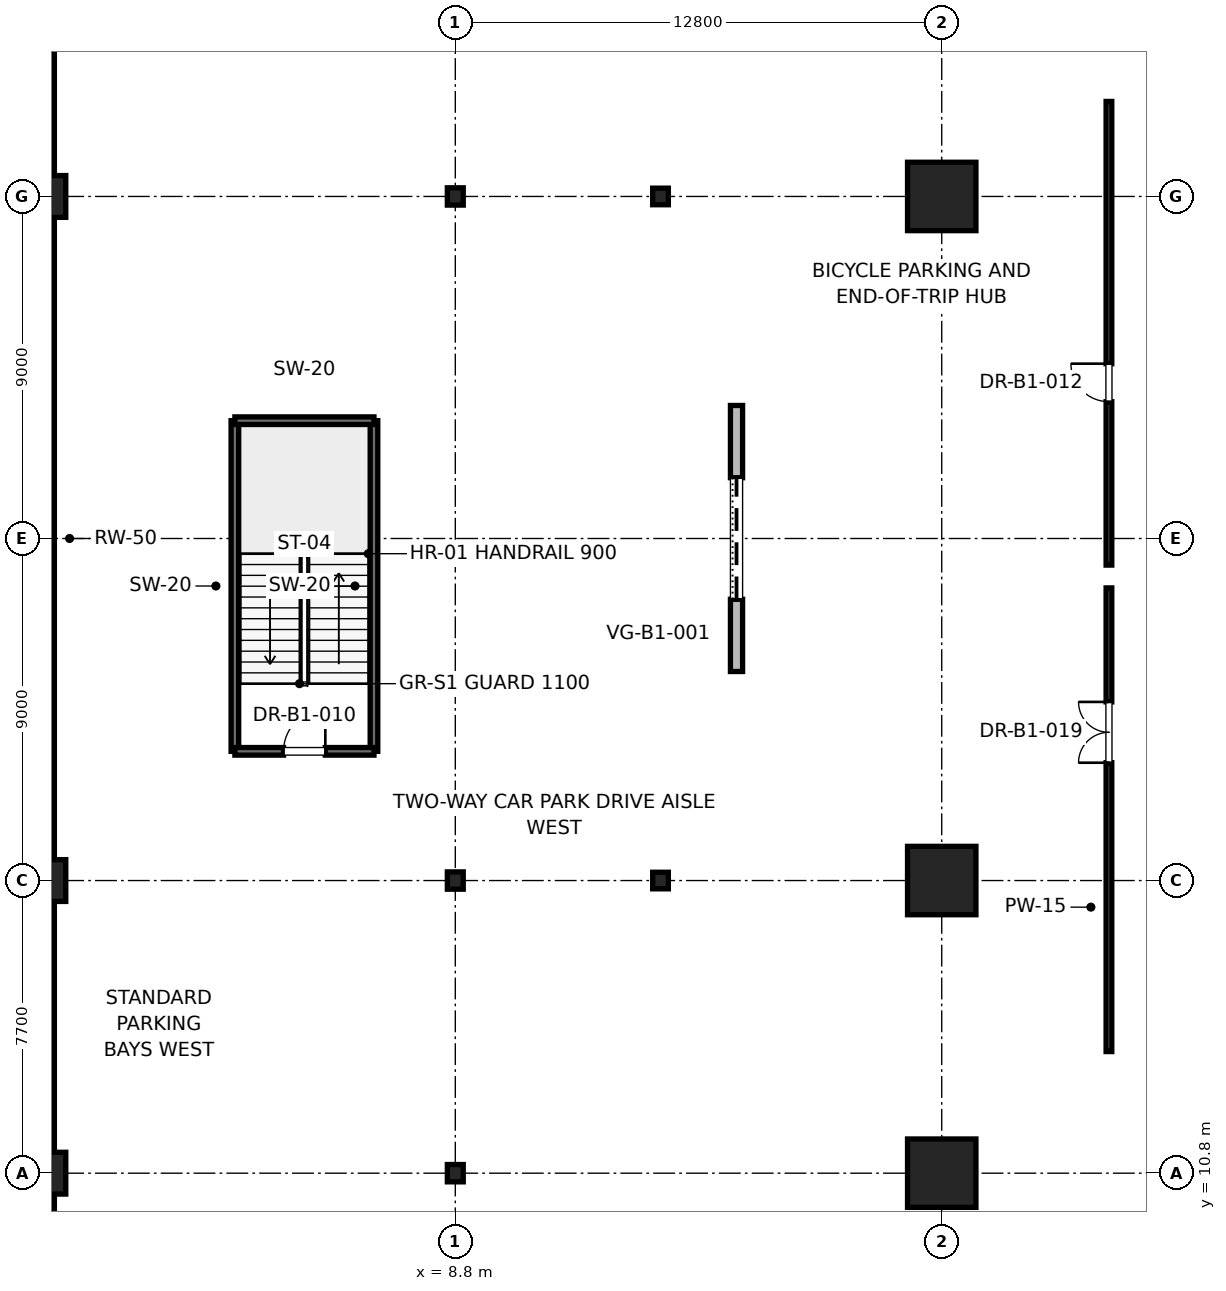
"""IFC4 building model, lengths in metres.
Left out: names, types, materials, properties, quantities, classifications, styles, units other than length and angle.
Written with IfcOpenShell. Run it as: python <this file> out.ifc"""

import sys

from ifc_helpers import new_model, si_unit, direction, frame, frame_2d, origin, origin_2d, place, context, subcontext, project, spatial, rectangle, i_section, extrude, element, fill, save


model = new_model("IFC4")
c1 = context("Model", 3, precision=1e-05, world=origin(), true_north=direction((0.0, 1.0)))
c2 = subcontext(c1, "Body", "Model", "MODEL_VIEW")
j1 = project(units=[si_unit("LENGTHUNIT", "METRE"), si_unit("PLANEANGLEUNIT", "RADIAN")], contexts=[c1])
p1 = place(None, origin())
s1 = spatial("IfcSite", under=j1, at=p1, CompositionType="ELEMENT")
p2 = place(p1, origin())
s2 = spatial("IfcBuilding", under=s1, at=p2, CompositionType="ELEMENT")
p3 = place(p2, frame((0.0, 0.0, -4.5)))
s3 = spatial("IfcBuildingStorey", under=s2, at=p3, CompositionType="ELEMENT", Elevation=-4.5)
for number, where, z_axis, x_axis in (
    (1, (21.6, 18.5, 0.0), (0.0, 0.0, 1.0), (1.0, 0.0, 0.0)),
    (2, (21.6, 36.5, 0.0), (0.0, 0.0, 1.0), (1.0, 0.0, 0.0)),
    (3, (21.6, 10.8, 0.0), (0.0, 0.0, 1.0), (1.0, 0.0, 0.0)),
):
    element("IfcColumn", number, at=place(p3, frame(where, z_axis=z_axis, x_axis=x_axis)), inside=s3, PredefinedType="COLUMN", context=c2, shape_type="SweptSolid", body=[
        extrude(rectangle(XDim=1.8, YDim=1.8, at=origin_2d()), origin(), (0.0, 0.0, 1.0), 4.5),
    ])
for number, where, z_axis, x_axis in (
    (4, (14.2, 18.5, 0.0), (0.0, 0.0, 1.0), (1.0, 0.0, 0.0)),
    (5, (14.2, 36.5, 0.0), (0.0, 0.0, 1.0), (1.0, 0.0, 0.0)),
):
    element("IfcColumn", number, at=place(p3, frame(where, z_axis=z_axis, x_axis=x_axis)), inside=s3, PredefinedType="COLUMN", context=c2, shape_type="SweptSolid", body=[
        extrude(i_section(OverallWidth=0.412, OverallDepth=0.437, WebThickness=0.036, FlangeThickness=0.058, FilletRadius=0.015, at=origin_2d()), origin(), (0.0, 0.0, 1.0), 4.5),
    ])
for number, where, z_axis, x_axis in (
    (6, (-2.0, 10.8, 0.0), (0.0, 0.0, 1.0), (1.0, 0.0, 0.0)),
    (7, (-2.0, 18.5, 0.0), (0.0, 0.0, 1.0), (1.0, 0.0, 0.0)),
    (8, (-2.0, 36.5, 0.0), (0.0, 0.0, 1.0), (1.0, 0.0, 0.0)),
):
    element("IfcColumn", number, at=place(p3, frame(where, z_axis=z_axis, x_axis=x_axis)), inside=s3, PredefinedType="COLUMN", context=c2, shape_type="SweptSolid", body=[
        extrude(rectangle(XDim=1.1, YDim=1.1, at=origin_2d()), origin(), (0.0, 0.0, 1.0), 4.5),
    ])
for number, where, z_axis, x_axis in (
    (9, (8.8, 10.8, 0.0), (0.0, 0.0, 1.0), (1.0, 0.0, 0.0)),
    (10, (8.8, 18.5, 0.0), (0.0, 0.0, 1.0), (1.0, 0.0, 0.0)),
    (11, (8.8, 36.5, 0.0), (0.0, 0.0, 1.0), (1.0, 0.0, 0.0)),
):
    element("IfcColumn", number, at=place(p3, frame(where, z_axis=z_axis, x_axis=x_axis)), inside=s3, PredefinedType="COLUMN", context=c2, shape_type="SweptSolid", body=[
        extrude(i_section(OverallWidth=0.418, OverallDepth=0.456, WebThickness=0.042, FlangeThickness=0.067, FilletRadius=0.015, at=origin_2d()), origin(), (0.0, 0.0, 1.0), 4.5),
    ])
p4 = place(p3, frame((-2.0, 56.5, 0.0), z_axis=(0.0, 0.0, 1.0), x_axis=(0.0, -1.0, 0.0)))
e12 = element("IfcWall", 12, at=p4, inside=s3, PredefinedType="USERDEFINED", context=c2, shape_type="SweptSolid", body=[
    extrude(rectangle(XDim=58.0, YDim=0.5, at=frame_2d((29.0, 0.0))), origin(), (0.0, 0.0, 1.0), 3.4),
])
p5 = place(p3, frame((16.2, 24.0, 0.0), z_axis=(0.0, 0.0, 1.0), x_axis=(0.0, 1.0, 0.0)))
e13 = element("IfcWall", 13, at=p5, inside=s3, PredefinedType="SOLIDWALL", context=c2, shape_type="SweptSolid", body=[
    extrude(rectangle(XDim=7.0, YDim=0.32, at=frame_2d((3.5, 0.0))), origin(), (0.0, 0.0, 1.0), 4.22),
])
p6 = place(p5, frame((1.9, 0.0, 0.0)))
e14 = element("IfcOpeningElement", 14, at=p6, cuts=e13, PredefinedType="OPENING", context=c2, shape_type="SweptSolid", body=[
    extrude(rectangle(XDim=3.2, YDim=2.8, at=frame_2d((1.6, 1.4))), frame((0.0, 0.16, 0.0), z_axis=(0.0, -1.0, 0.0), x_axis=(1.0, 0.0, 0.0)), (0.0, 0.0, 1.0), 0.32),
])
for number, where, z_axis, x_axis in (
    (15, (3.0, 21.9, 0.0), (0.0, 0.0, 1.0), (0.0, 1.0, 0.0)),
    (16, (6.66, 21.9, 0.0), (0.0, 0.0, 1.0), (0.0, 1.0, 0.0)),
):
    element("IfcWall", number, at=place(p3, frame(where, z_axis=z_axis, x_axis=x_axis)), inside=s3, PredefinedType="SOLIDWALL", context=c2, shape_type="SweptSolid", body=[
        extrude(rectangle(XDim=8.7, YDim=0.2, at=frame_2d((4.35, 0.0))), origin(), (0.0, 0.0, 1.0), 4.22),
    ])
p7 = place(p3, frame((3.0, 30.6, 0.0), z_axis=(0.0, 0.0, 1.0), x_axis=(1.0, 0.0, 0.0)))
e17 = element("IfcWall", 17, at=p7, inside=s3, PredefinedType="SOLIDWALL", context=c2, shape_type="SweptSolid", body=[
    extrude(rectangle(XDim=3.66, YDim=0.2, at=frame_2d((1.83, 0.0))), origin(), (0.0, 0.0, 1.0), 4.22),
])
p8 = place(p3, frame((3.0, 21.9, 0.0), z_axis=(0.0, 0.0, 1.0), x_axis=(1.0, 0.0, 0.0)))
e18 = element("IfcWall", 18, at=p8, inside=s3, PredefinedType="SOLIDWALL", context=c2, shape_type="SweptSolid", body=[
    extrude(rectangle(XDim=3.66, YDim=0.2, at=frame_2d((1.83, 0.0))), origin(), (0.0, 0.0, 1.0), 4.22),
])
p9 = place(p8, frame((1.28, 0.0, 0.0)))
e19 = element("IfcOpeningElement", 19, at=p9, cuts=e18, PredefinedType="OPENING", context=c2, shape_type="SweptSolid", body=[
    extrude(rectangle(XDim=1.1, YDim=2.15, at=frame_2d((0.55, 1.075))), frame((0.0, 0.1, 0.0), z_axis=(0.0, -1.0, 0.0), x_axis=(1.0, 0.0, 0.0)), (0.0, 0.0, 1.0), 0.2),
])
p10 = place(p3, frame((26.0, 14.0, 0.0), z_axis=(0.0, 0.0, 1.0), x_axis=(0.0, 1.0, 0.0)))
e20 = element("IfcWall", 20, at=p10, inside=s3, PredefinedType="PARTITIONING", context=c2, shape_type="SweptSolid", body=[
    extrude(rectangle(XDim=12.2, YDim=0.15, at=frame_2d((6.1, 0.0))), origin(), (0.0, 0.0, 1.0), 2.85),
])
p11 = place(p10, frame((7.6, 0.0, 0.0)))
e21 = element("IfcOpeningElement", 21, at=p11, cuts=e20, PredefinedType="OPENING", context=c2, shape_type="SweptSolid", body=[
    extrude(rectangle(XDim=1.6, YDim=2.25, at=frame_2d((0.8, 1.125))), frame((0.0, 0.075, 0.0), z_axis=(0.0, -1.0, 0.0), x_axis=(1.0, 0.0, 0.0)), (0.0, 0.0, 1.0), 0.15),
])
p12 = place(p3, frame((26.0, 26.8, 0.0), z_axis=(0.0, 0.0, 1.0), x_axis=(0.0, 1.0, 0.0)))
e22 = element("IfcWall", 22, at=p12, inside=s3, PredefinedType="PARTITIONING", context=c2, shape_type="SweptSolid", body=[
    extrude(rectangle(XDim=12.2, YDim=0.15, at=frame_2d((6.1, 0.0))), origin(), (0.0, 0.0, 1.0), 2.85),
])
p13 = place(p12, frame((4.3, 0.0, 0.0)))
e23 = element("IfcOpeningElement", 23, at=p13, cuts=e22, PredefinedType="OPENING", context=c2, shape_type="SweptSolid", body=[
    extrude(rectangle(XDim=1.0, YDim=2.15, at=frame_2d((0.5, 1.075))), frame((0.0, 0.075, 0.0), z_axis=(0.0, -1.0, 0.0), x_axis=(1.0, 0.0, 0.0)), (0.0, 0.0, 1.0), 0.15),
])
p14 = place(p6, origin())
e24 = element("IfcDoor", 24, at=p14, inside=s3, OperationType="ROLLINGUP", PredefinedType="GATE", context=c2, shape_type="SweptSolid", body=[
    extrude(rectangle(XDim=3.2, YDim=2.8, at=frame_2d((1.6, 1.4))), frame((0.0, 0.025, 0.0), z_axis=(0.0, -1.0, 0.0), x_axis=(1.0, 0.0, 0.0)), (0.0, 0.0, 1.0), 0.05),
])
fill(e14, e24)
p15 = place(p9, origin())
e25 = element("IfcDoor", 25, at=p15, inside=s3, OperationType="SINGLE_SWING_RIGHT", PredefinedType="DOOR", context=c2, shape_type="SweptSolid", body=[
    extrude(rectangle(XDim=1.1, YDim=2.15, at=frame_2d((0.55, 1.075))), frame((0.0, 0.025, 0.0), z_axis=(0.0, -1.0, 0.0), x_axis=(1.0, 0.0, 0.0)), (0.0, 0.0, 1.0), 0.05),
])
fill(e19, e25)
p16 = place(p11, origin())
e26 = element("IfcDoor", 26, at=p16, inside=s3, OperationType="DOUBLE_DOOR_SINGLE_SWING", PredefinedType="DOOR", context=c2, shape_type="SweptSolid", body=[
    extrude(rectangle(XDim=1.6, YDim=2.25, at=frame_2d((0.8, 1.125))), frame((0.0, 0.025, 0.0), z_axis=(0.0, -1.0, 0.0), x_axis=(1.0, 0.0, 0.0)), (0.0, 0.0, 1.0), 0.05),
])
fill(e21, e26)
p17 = place(p13, origin())
e27 = element("IfcDoor", 27, at=p17, inside=s3, OperationType="SINGLE_SWING_RIGHT", PredefinedType="DOOR", context=c2, shape_type="SweptSolid", body=[
    extrude(rectangle(XDim=1.0, YDim=2.15, at=frame_2d((0.5, 1.075))), frame((0.0, 0.025, 0.0), z_axis=(0.0, -1.0, 0.0), x_axis=(1.0, 0.0, 0.0)), (0.0, 0.0, 1.0), 0.05),
])
fill(e23, e27)
save(model, sys.argv[1])
